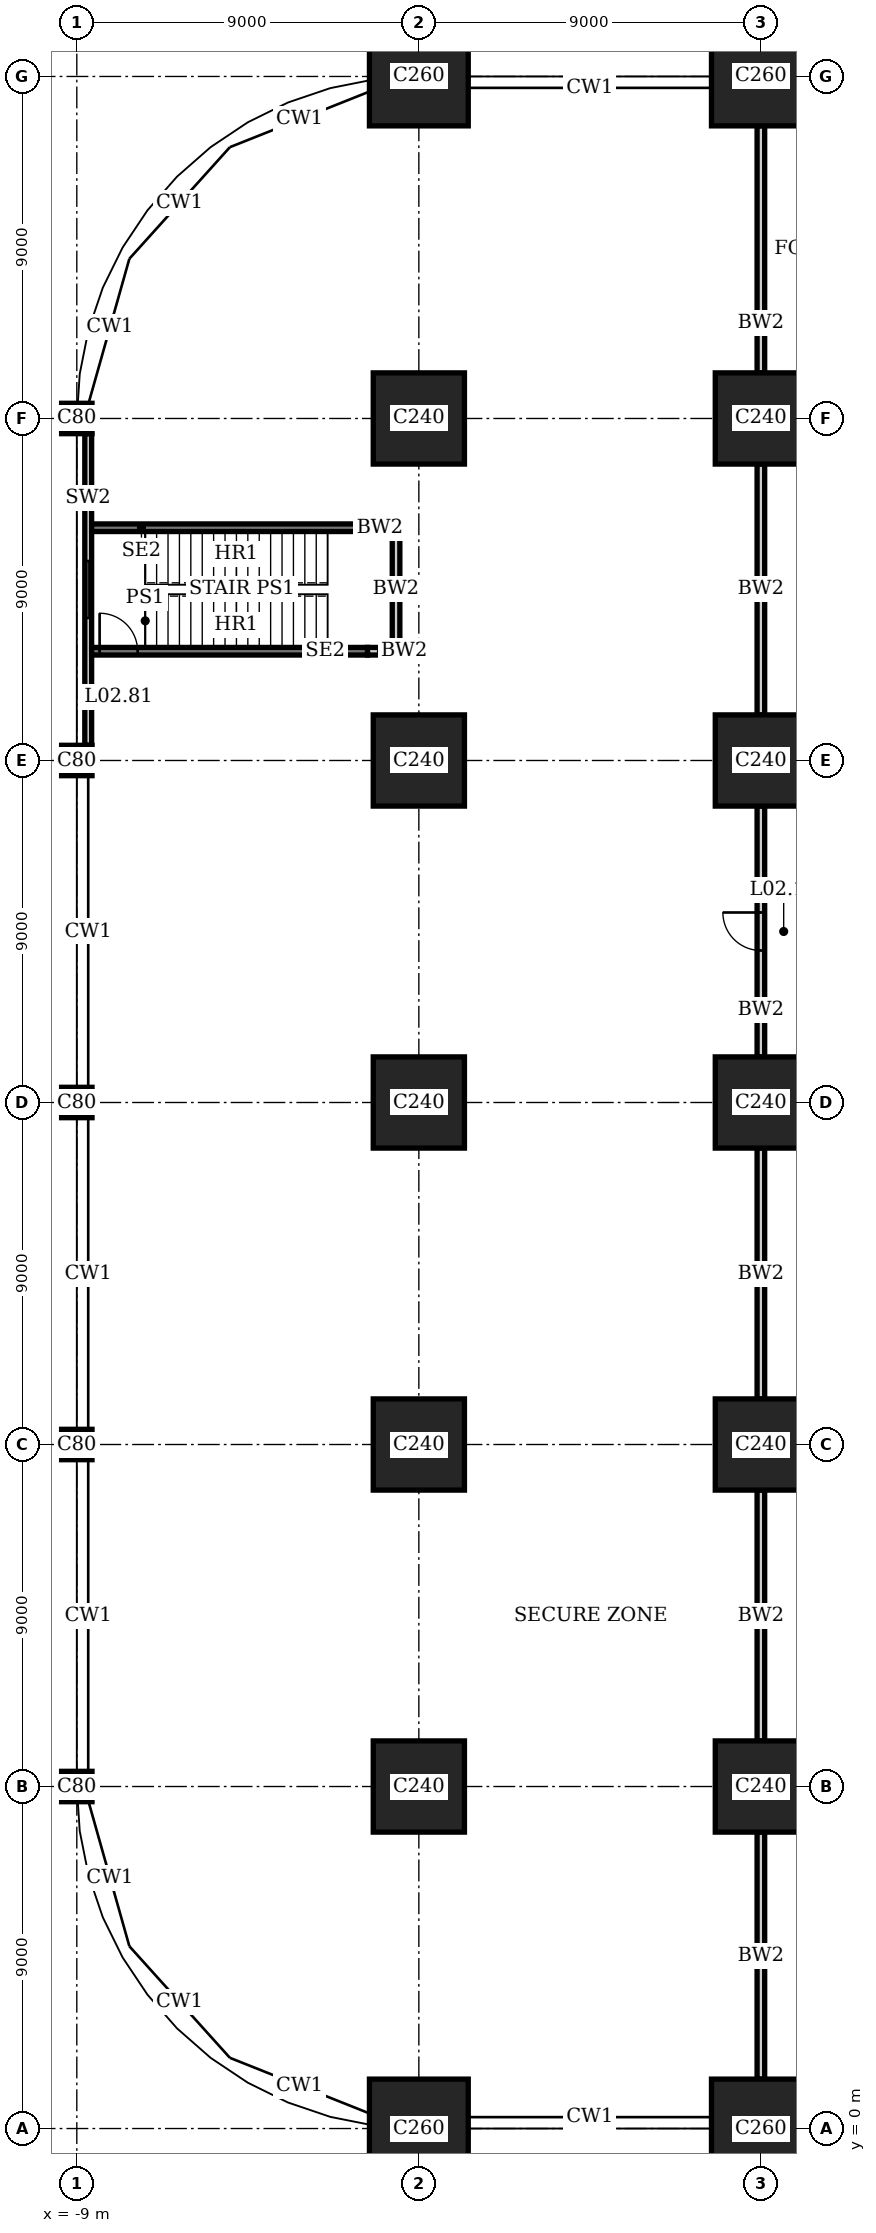
"""IFC4 building model, lengths in metres.
Left out: names, types, materials, properties, quantities, classifications, styles, units other than length and angle.
Written with IfcOpenShell. Run it as: python <this file> out.ifc"""

import sys

from ifc_helpers import new_model, si_unit, direction, frame, frame_2d, origin, origin_with_axes, origin_2d, place, context, subcontext, project, spatial, rectangle, extrude, element, fill, save


model = new_model("IFC4")
c1 = context("Model", 3, precision=1e-05, world=origin(), true_north=direction((0.0, 1.0)))
c2 = subcontext(c1, "Body", "Model", "MODEL_VIEW")
j1 = project(units=[si_unit("LENGTHUNIT", "METRE"), si_unit("PLANEANGLEUNIT", "RADIAN")], contexts=[c1])
p1 = place(None, origin())
s1 = spatial("IfcSite", under=j1, at=p1, CompositionType="ELEMENT")
p2 = place(p1, origin())
s2 = spatial("IfcBuilding", under=s1, at=p2, CompositionType="ELEMENT")
p3 = place(p2, frame((0.0, 0.0, 10.8)))
s3 = spatial("IfcBuildingStorey", under=s2, at=p3, CompositionType="ELEMENT", Elevation=10.8)
for number, where, z_axis, x_axis in (
    (1, (-9.0, 9.0, 0.0), (0.0, 0.0, 1.0), (1.0, 0.0, 0.0)),
    (2, (-9.0, 18.0, 0.0), (0.0, 0.0, 1.0), (1.0, 0.0, 0.0)),
    (3, (-9.0, 27.0, 0.0), (0.0, 0.0, 1.0), (1.0, 0.0, 0.0)),
    (4, (-9.0, 36.0, 0.0), (0.0, 0.0, 1.0), (1.0, 0.0, 0.0)),
    (5, (-9.0, 45.0, 0.0), (0.0, 0.0, 1.0), (1.0, 0.0, 0.0)),
):
    element("IfcColumn", number, at=place(p3, frame(where, z_axis=z_axis, x_axis=x_axis)), inside=s3, PredefinedType="COLUMN", context=c2, shape_type="SweptSolid", body=[
        extrude(rectangle(XDim=0.8, YDim=0.8, at=origin_2d()), origin(), (0.0, 0.0, 1.0), 5.0),
    ])
p4 = place(p3, origin_with_axes())
e6 = element("IfcColumn", 6, at=p4, inside=s3, PredefinedType="COLUMN", context=c2, shape_type="SweptSolid", body=[
    extrude(rectangle(XDim=2.6, YDim=2.6, at=origin_2d()), origin(), (0.0, 0.0, 1.0), 5.0),
])
for number, where, z_axis, x_axis in (
    (7, (0.0, 9.0, 0.0), (0.0, 0.0, 1.0), (1.0, 0.0, 0.0)),
    (8, (0.0, 18.0, 0.0), (0.0, 0.0, 1.0), (1.0, 0.0, 0.0)),
    (9, (0.0, 27.0, 0.0), (0.0, 0.0, 1.0), (1.0, 0.0, 0.0)),
    (10, (0.0, 36.0, 0.0), (0.0, 0.0, 1.0), (1.0, 0.0, 0.0)),
    (11, (0.0, 45.0, 0.0), (0.0, 0.0, 1.0), (1.0, 0.0, 0.0)),
):
    element("IfcColumn", number, at=place(p3, frame(where, z_axis=z_axis, x_axis=x_axis)), inside=s3, PredefinedType="COLUMN", context=c2, shape_type="SweptSolid", body=[
        extrude(rectangle(XDim=2.4, YDim=2.4, at=origin_2d()), origin(), (0.0, 0.0, 1.0), 5.0),
    ])
for number, where, z_axis, x_axis in (
    (12, (0.0, 54.0, 0.0), (0.0, 0.0, 1.0), (1.0, 0.0, 0.0)),
    (13, (9.0, 0.0, 0.0), (0.0, 0.0, 1.0), (1.0, 0.0, 0.0)),
):
    element("IfcColumn", number, at=place(p3, frame(where, z_axis=z_axis, x_axis=x_axis)), inside=s3, PredefinedType="COLUMN", context=c2, shape_type="SweptSolid", body=[
        extrude(rectangle(XDim=2.6, YDim=2.6, at=origin_2d()), origin(), (0.0, 0.0, 1.0), 5.0),
    ])
for number, where, z_axis, x_axis in (
    (14, (9.0, 9.0, 0.0), (0.0, 0.0, 1.0), (1.0, 0.0, 0.0)),
    (15, (9.0, 18.0, 0.0), (0.0, 0.0, 1.0), (1.0, 0.0, 0.0)),
    (16, (9.0, 27.0, 0.0), (0.0, 0.0, 1.0), (1.0, 0.0, 0.0)),
    (17, (9.0, 36.0, 0.0), (0.0, 0.0, 1.0), (1.0, 0.0, 0.0)),
    (18, (9.0, 45.0, 0.0), (0.0, 0.0, 1.0), (1.0, 0.0, 0.0)),
):
    element("IfcColumn", number, at=place(p3, frame(where, z_axis=z_axis, x_axis=x_axis)), inside=s3, PredefinedType="COLUMN", context=c2, shape_type="SweptSolid", body=[
        extrude(rectangle(XDim=2.4, YDim=2.4, at=origin_2d()), origin(), (0.0, 0.0, 1.0), 5.0),
    ])
p5 = place(p3, frame((9.0, 54.0, 0.0), z_axis=(0.0, 0.0, 1.0), x_axis=(1.0, 0.0, 0.0)))
e19 = element("IfcColumn", 19, at=p5, inside=s3, PredefinedType="COLUMN", context=c2, shape_type="SweptSolid", body=[
    extrude(rectangle(XDim=2.6, YDim=2.6, at=origin_2d()), origin(), (0.0, 0.0, 1.0), 5.0),
])
p6 = place(p3, frame((-8.7, 36.4, 0.0), z_axis=(0.0, 0.0, 1.0), x_axis=(0.0, 1.0, 0.0)))
e20 = element("IfcWall", 20, at=p6, inside=s3, PredefinedType="SOLIDWALL", context=c2, shape_type="SweptSolid", body=[
    extrude(rectangle(XDim=8.2, YDim=0.18, at=frame_2d((4.1, 0.0))), origin(), (0.0, 0.0, 1.0), 3.8),
])
p7 = place(p6, frame((3.35, 0.0, 0.3)))
e21 = element("IfcOpeningElement", 21, at=p7, cuts=e20, PredefinedType="OPENING", context=c2, shape_type="SweptSolid", body=[
    extrude(rectangle(XDim=1.5, YDim=2.4, at=frame_2d((0.75, 1.2))), frame((0.0, 0.1, 0.0), z_axis=(0.0, -1.0, 0.0), x_axis=(1.0, 0.0, 0.0)), (0.0, 0.0, 1.0), 0.2),
])
p8 = place(p3, frame((9.0, 1.3, 0.0), z_axis=(0.0, 0.0, 1.0), x_axis=(0.0, 1.0, 0.0)))
e22 = element("IfcWall", 22, at=p8, inside=s3, PredefinedType="SOLIDWALL", context=c2, shape_type="SweptSolid", body=[
    extrude(rectangle(XDim=6.5, YDim=0.2, at=frame_2d((3.25, 0.0))), origin(), (0.0, 0.0, 1.0), 3.8),
])
for number, where, z_axis, x_axis in (
    (23, (9.0, 10.2, 0.0), (0.0, 0.0, 1.0), (0.0, 1.0, 0.0)),
    (24, (9.0, 19.2, 0.0), (0.0, 0.0, 1.0), (0.0, 1.0, 0.0)),
):
    element("IfcWall", number, at=place(p3, frame(where, z_axis=z_axis, x_axis=x_axis)), inside=s3, PredefinedType="SOLIDWALL", context=c2, shape_type="SweptSolid", body=[
        extrude(rectangle(XDim=6.6, YDim=0.2, at=frame_2d((3.3, 0.0))), origin(), (0.0, 0.0, 1.0), 3.8),
    ])
p9 = place(p3, frame((9.0, 28.2, 0.0), z_axis=(0.0, 0.0, 1.0), x_axis=(0.0, 1.0, 0.0)))
e25 = element("IfcWall", 25, at=p9, inside=s3, PredefinedType="SOLIDWALL", context=c2, shape_type="SweptSolid", body=[
    extrude(rectangle(XDim=6.6, YDim=0.2, at=frame_2d((3.3, 0.0))), origin(), (0.0, 0.0, 1.0), 3.8),
])
p10 = place(p9, frame((2.8, 0.0, 0.0)))
e26 = element("IfcOpeningElement", 26, at=p10, cuts=e25, PredefinedType="OPENING", context=c2, shape_type="SweptSolid", body=[
    extrude(rectangle(XDim=1.0, YDim=2.4, at=frame_2d((0.5, 1.2))), frame((0.0, 0.11, 0.0), z_axis=(0.0, -1.0, 0.0), x_axis=(1.0, 0.0, 0.0)), (0.0, 0.0, 1.0), 0.22),
])
p11 = place(p3, frame((9.0, 37.2, 0.0), z_axis=(0.0, 0.0, 1.0), x_axis=(0.0, 1.0, 0.0)))
e27 = element("IfcWall", 27, at=p11, inside=s3, PredefinedType="SOLIDWALL", context=c2, shape_type="SweptSolid", body=[
    extrude(rectangle(XDim=6.6, YDim=0.2, at=frame_2d((3.3, 0.0))), origin(), (0.0, 0.0, 1.0), 3.8),
])
p12 = place(p3, frame((9.0, 46.2, 0.0), z_axis=(0.0, 0.0, 1.0), x_axis=(0.0, 1.0, 0.0)))
e28 = element("IfcWall", 28, at=p12, inside=s3, PredefinedType="SOLIDWALL", context=c2, shape_type="SweptSolid", body=[
    extrude(rectangle(XDim=6.5, YDim=0.2, at=frame_2d((3.25, 0.0))), origin(), (0.0, 0.0, 1.0), 3.8),
])
p13 = place(p3, frame((-8.61, 38.875, 0.0), z_axis=(0.0, 0.0, 1.0), x_axis=(1.0, 0.0, 0.0)))
e29 = element("IfcWall", 29, at=p13, inside=s3, PredefinedType="SOLIDWALL", context=c2, shape_type="SweptSolid", body=[
    extrude(rectangle(XDim=7.26, YDim=0.2, at=frame_2d((3.63, 0.0))), origin(), (0.0, 0.0, 1.0), 5.0),
])
p14 = place(p13, frame((0.21, 0.0, 0.0)))
e30 = element("IfcOpeningElement", 30, at=p14, cuts=e29, PredefinedType="OPENING", context=c2, shape_type="SweptSolid", body=[
    extrude(rectangle(XDim=1.0, YDim=2.4, at=frame_2d((0.5, 1.2))), frame((0.0, 0.11, 0.0), z_axis=(0.0, -1.0, 0.0), x_axis=(1.0, 0.0, 0.0)), (0.0, 0.0, 1.0), 0.22),
])
p15 = place(p3, frame((-8.61, 42.125, 0.0), z_axis=(0.0, 0.0, 1.0), x_axis=(1.0, 0.0, 0.0)))
e31 = element("IfcWall", 31, at=p15, inside=s3, PredefinedType="SOLIDWALL", context=c2, shape_type="SweptSolid", body=[
    extrude(rectangle(XDim=7.26, YDim=0.2, at=frame_2d((3.63, 0.0))), origin(), (0.0, 0.0, 1.0), 5.0),
])
for number, where, z_axis, x_axis in (
    (32, (-1.35, 38.875, 0.0), (0.0, 0.0, 1.0), (1.0, 0.0, 0.0)),
    (33, (-1.35, 42.125, 0.0), (0.0, 0.0, 1.0), (1.0, 0.0, 0.0)),
):
    element("IfcWall", number, at=place(p3, frame(where, z_axis=z_axis, x_axis=x_axis)), inside=s3, PredefinedType="SOLIDWALL", context=c2, shape_type="SweptSolid", body=[
        extrude(rectangle(XDim=0.65, YDim=0.2, at=frame_2d((0.325, 0.0))), origin(), (0.0, 0.0, 1.0), 5.0),
    ])
p16 = place(p3, frame((-0.6, 38.775, 0.0), z_axis=(0.0, 0.0, 1.0), x_axis=(0.0, 1.0, 0.0)))
e34 = element("IfcWall", 34, at=p16, inside=s3, PredefinedType="SOLIDWALL", context=c2, shape_type="SweptSolid", body=[
    extrude(rectangle(XDim=3.45, YDim=0.2, at=frame_2d((1.725, 0.0))), origin(), (0.0, 0.0, 1.0), 3.8),
])
p17 = place(p7, origin())
e35 = element("IfcWindow", 35, at=p17, inside=s3, PartitioningType="SINGLE_PANEL", PredefinedType="WINDOW", context=c2, shape_type="SweptSolid", body=[
    extrude(rectangle(XDim=1.5, YDim=2.4, at=frame_2d((0.75, 1.2))), frame((0.0, 0.03, 0.0), z_axis=(0.0, -1.0, 0.0), x_axis=(1.0, 0.0, 0.0)), (0.0, 0.0, 1.0), 0.06),
])
fill(e21, e35)
p18 = place(p10, origin())
e36 = element("IfcDoor", 36, at=p18, inside=s3, OperationType="SINGLE_SWING_LEFT", PredefinedType="DOOR", context=c2, shape_type="SweptSolid", body=[
    extrude(rectangle(XDim=1.0, YDim=2.4, at=frame_2d((0.5, 1.2))), frame((0.0, 0.035, 0.0), z_axis=(0.0, -1.0, 0.0), x_axis=(1.0, 0.0, 0.0)), (0.0, 0.0, 1.0), 0.07),
])
fill(e26, e36)
p19 = place(p14, origin())
e37 = element("IfcDoor", 37, at=p19, inside=s3, OperationType="SINGLE_SWING_RIGHT", PredefinedType="DOOR", context=c2, shape_type="SweptSolid", body=[
    extrude(rectangle(XDim=1.0, YDim=2.4, at=frame_2d((0.5, 1.2))), frame((0.0, 0.03, 0.0), z_axis=(0.0, -1.0, 0.0), x_axis=(1.0, 0.0, 0.0)), (0.0, 0.0, 1.0), 0.06),
])
fill(e30, e37)
save(model, sys.argv[1])
